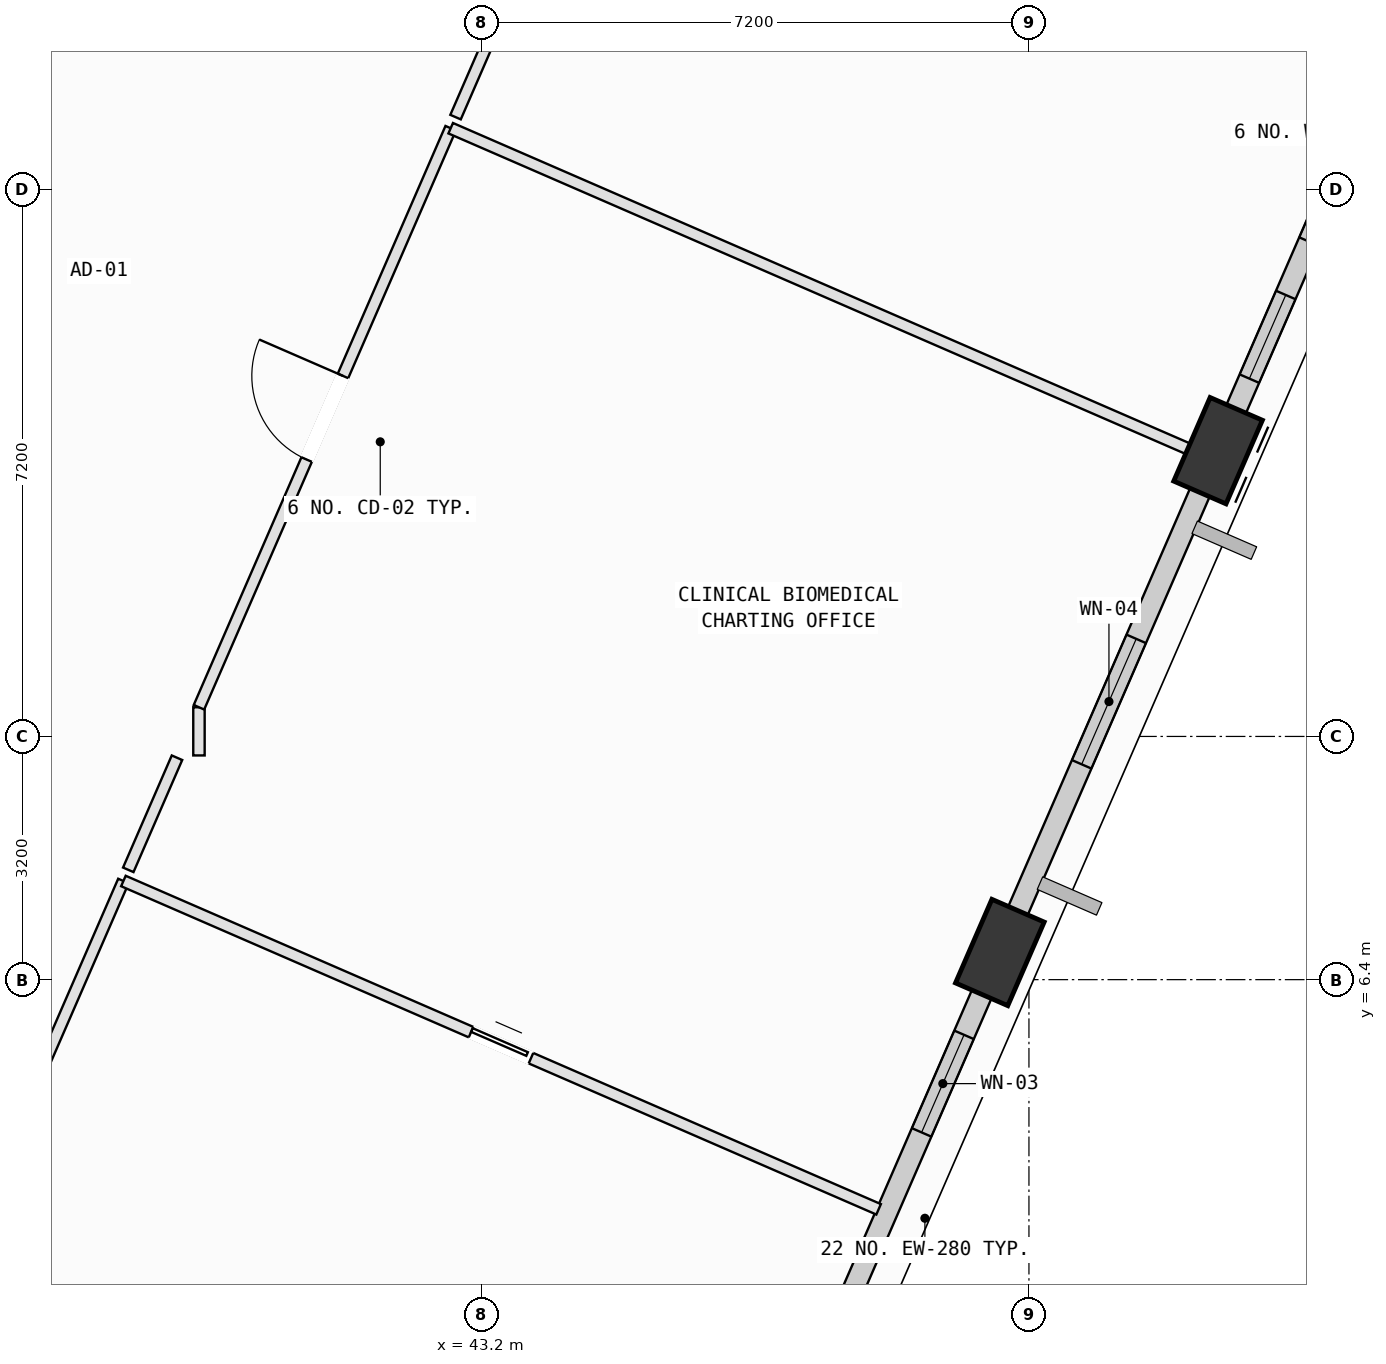
"""IFC4 building model, lengths in metres.
Left out: names, types, materials, properties, quantities, classifications, styles, units other than length and angle.
Written with IfcOpenShell. Run it as: python <this file> out.ifc"""

import sys

from ifc_helpers import new_model, si_unit, direction, frame, frame_2d, origin, origin_2d, place, context, subcontext, project, spatial, rectangle, extrude, element, fill, save


model = new_model("IFC4")
c1 = context("Model", 3, precision=1e-05, world=origin(), true_north=direction((0.0, 1.0)))
c2 = subcontext(c1, "Body", "Model", "MODEL_VIEW")
j1 = project(units=[si_unit("LENGTHUNIT", "METRE"), si_unit("PLANEANGLEUNIT", "RADIAN")], contexts=[c1])
p1 = place(None, origin())
s1 = spatial("IfcSite", under=j1, at=p1, CompositionType="ELEMENT")
p2 = place(p1, origin())
s2 = spatial("IfcBuilding", under=s1, at=p2, CompositionType="ELEMENT")
p3 = place(p2, frame((0.0, 0.0, 312.6)))
s3 = spatial("IfcBuildingStorey", under=s2, at=p3, CompositionType="ELEMENT", Elevation=312.6)
for number, where, z_axis, x_axis in (
    (1, (50.017, 6.757, 0.002), (0.0, 0.0, 1.0), (0.399, 0.917, 0.0)),
    (2, (52.888, 13.36, 0.002), (0.0, 0.0, 1.0), (0.399, 0.917, 0.0)),
):
    element("IfcColumn", number, at=place(p3, frame(where, z_axis=z_axis, x_axis=x_axis)), inside=s3, PredefinedType="COLUMN", context=c2, shape_type="SweptSolid", body=[
        extrude(rectangle(XDim=1.2, YDim=0.75, at=origin_2d()), origin(), (0.0, 0.0, 1.0), 3.996),
    ])
p4 = place(p3, frame((49.859, 6.393, 0.0), z_axis=(0.0, 0.0, 1.0), x_axis=(-0.398758169539, -0.917056117272, 0.0)))
e3 = element("IfcWall", 3, at=p4, inside=s3, PredefinedType="SOLIDWALL", context=c2, shape_type="SweptSolid", body=[
    extrude(rectangle(XDim=6.405, YDim=0.28, at=frame_2d((3.202, 0.0))), origin(), (0.0, 0.0, 1.0), 3.265),
])
p5 = place(p4, frame((0.784, 0.0, 0.75)))
e4 = element("IfcOpeningElement", 4, at=p5, cuts=e3, PredefinedType="OPENING", context=c2, shape_type="SweptSolid", body=[
    extrude(rectangle(XDim=1.4, YDim=1.85, at=frame_2d((0.7, 0.925))), frame((0.0, 0.15, 0.0), z_axis=(0.0, -1.0, 0.0), x_axis=(1.0, 0.0, 0.0)), (0.0, 0.0, 1.0), 0.3),
])
p6 = place(p3, frame((52.729, 12.996, 0.0), z_axis=(0.0, 0.0, 1.0), x_axis=(-0.398744230651, -0.917062178112, 0.0)))
e5 = element("IfcWall", 5, at=p6, inside=s3, PredefinedType="SOLIDWALL", context=c2, shape_type="SweptSolid", body=[
    extrude(rectangle(XDim=6.405, YDim=0.28, at=frame_2d((3.203, 0.0))), origin(), (0.0, 0.0, 1.0), 3.265),
])
p7 = place(p6, frame((2.302, 0.0, 0.75)))
e6 = element("IfcOpeningElement", 6, at=p7, cuts=e5, PredefinedType="OPENING", context=c2, shape_type="SweptSolid", body=[
    extrude(rectangle(XDim=1.8, YDim=2.05, at=frame_2d((0.9, 1.025))), frame((0.0, 0.15, 0.0), z_axis=(0.0, -1.0, 0.0), x_axis=(1.0, 0.0, 0.0)), (0.0, 0.0, 1.0), 0.3),
])
p8 = place(p3, frame((55.601, 19.598, 0.0), z_axis=(0.0, 0.0, 1.0), x_axis=(-0.398744230651, -0.917062178112, 0.0)))
e7 = element("IfcWall", 7, at=p8, inside=s3, PredefinedType="SOLIDWALL", context=c2, shape_type="SweptSolid", body=[
    extrude(rectangle(XDim=6.405, YDim=0.28, at=frame_2d((3.203, 0.0))), origin(), (0.0, 0.0, 1.0), 3.265),
])
p9 = place(p8, frame((2.602, 0.0, 0.75)))
e8 = element("IfcOpeningElement", 8, at=p9, cuts=e7, PredefinedType="OPENING", context=c2, shape_type="SweptSolid", body=[
    extrude(rectangle(XDim=1.2, YDim=1.75, at=frame_2d((0.6, 0.875))), frame((0.0, 0.15, 0.0), z_axis=(0.0, -1.0, 0.0), x_axis=(1.0, 0.0, 0.0)), (0.0, 0.0, 1.0), 0.3),
])
p10 = place(p8, frame((4.569, 0.0, 0.75)))
e9 = element("IfcOpeningElement", 9, at=p10, cuts=e7, PredefinedType="OPENING", context=c2, shape_type="SweptSolid", body=[
    extrude(rectangle(XDim=1.2, YDim=1.75, at=frame_2d((0.6, 0.875))), frame((0.0, 0.15, 0.0), z_axis=(0.0, -1.0, 0.0), x_axis=(1.0, 0.0, 0.0)), (0.0, 0.0, 1.0), 0.3),
])
p11 = place(p3, frame((33.286, -4.26, 0.0), z_axis=(0.0, 0.0, 1.0), x_axis=(0.398794571869, 0.9170402878, 0.0)))
e10 = element("IfcWall", 10, at=p11, inside=s3, PredefinedType="PARTITIONING", context=c2, shape_type="SweptSolid", body=[
    extrude(rectangle(XDim=13.04, YDim=0.15, at=frame_2d((6.52, 0.0))), origin(), (0.0, 0.0, 1.0), 2.765),
])
p12 = place(p3, frame((38.486, 7.698, 0.0), z_axis=(0.0, 0.0, 1.0), x_axis=(0.917068265028, -0.398730231207, 0.0)))
e11 = element("IfcWall", 11, at=p12, inside=s3, PredefinedType="PARTITIONING", context=c2, shape_type="SweptSolid", body=[
    extrude(rectangle(XDim=10.834, YDim=0.15, at=frame_2d((5.417, 0.0))), origin(), (0.0, 0.0, 1.0), 2.765),
])
p13 = place(p12, frame((4.987, 0.0, 0.0)))
e12 = element("IfcOpeningElement", 12, at=p13, cuts=e11, PredefinedType="OPENING", context=c2, shape_type="SweptSolid", body=[
    extrude(rectangle(XDim=0.86, YDim=2.06, at=frame_2d((0.43, 1.03))), frame((0.0, 0.085, 0.0), z_axis=(0.0, -1.0, 0.0), x_axis=(1.0, 0.0, 0.0)), (0.0, 0.0, 1.0), 0.17),
])
p14 = place(p3, frame((39.48, 9.35, 0.0), z_axis=(0.0, 0.0, 1.0), x_axis=(0.0, 1.0, 0.0)))
e13 = element("IfcWall", 13, at=p14, inside=s3, PredefinedType="PARTITIONING", context=c2, shape_type="SweptSolid", body=[
    extrude(rectangle(XDim=0.634, YDim=0.15, at=frame_2d((0.317, 0.0))), origin(), (0.0, 0.0, 1.0), 3.78),
])
p15 = place(p3, frame((39.48, 9.984, 0.0), z_axis=(0.0, 0.0, 1.0), x_axis=(0.398659488131, 0.917099020021, 0.0)))
e14 = element("IfcWall", 14, at=p15, inside=s3, PredefinedType="PARTITIONING", context=c2, shape_type="SweptSolid", body=[
    extrude(rectangle(XDim=8.308, YDim=0.15, at=frame_2d((4.154, 0.0))), origin(), (0.0, 0.0, 1.0), 3.78),
])
p16 = place(p15, frame((3.554, 0.0, 0.0)))
e15 = element("IfcOpeningElement", 15, at=p16, cuts=e14, PredefinedType="OPENING", context=c2, shape_type="SweptSolid", body=[
    extrude(rectangle(XDim=1.2, YDim=2.15, at=frame_2d((0.6, 1.075))), frame((0.0, 0.085, 0.0), z_axis=(0.0, -1.0, 0.0), x_axis=(1.0, 0.0, 0.0)), (0.0, 0.0, 1.0), 0.17),
])
p17 = place(p3, frame((42.792, 17.603, 0.0), z_axis=(0.0, 0.0, 1.0), x_axis=(0.917063112739, -0.398742081117, 0.0)))
e16 = element("IfcWall", 16, at=p17, inside=s3, PredefinedType="PARTITIONING", context=c2, shape_type="SweptSolid", body=[
    extrude(rectangle(XDim=11.18, YDim=0.15, at=frame_2d((5.59, 0.0))), origin(), (0.0, 0.0, 1.0), 3.78),
])
p18 = place(p3, frame((50.386, 7.03, 0.0), z_axis=(0.0, 0.0, 1.0), x_axis=(-0.398658726612, -0.91709935105, 0.0)))
e17 = element("IfcWall", 17, at=p18, inside=s3, PredefinedType="PARTITIONING", context=c2, shape_type="SweptSolid", body=[
    extrude(rectangle(XDim=0.795, YDim=0.15, at=frame_2d((0.397, 0.0))), origin(), (0.0, 0.0, 1.0), 3.265),
])
p19 = place(p3, frame((38.55, 7.845, 0.0), z_axis=(0.0, 0.0, 1.0), x_axis=(0.398476313607, 0.917178623548, 0.0)))
e18 = element("IfcWall", 18, at=p19, inside=s3, PredefinedType="PARTITIONING", context=c2, shape_type="SweptSolid", body=[
    extrude(rectangle(XDim=1.608, YDim=0.15, at=frame_2d((0.804, 0.0))), origin(), (0.0, 0.0, 1.0), 3.78),
])
p20 = place(p3, frame((42.856, 17.749, 0.0), z_axis=(0.0, 0.0, 1.0), x_axis=(0.398751440491, 0.917059043195, 0.0)))
e19 = element("IfcWall", 19, at=p20, inside=s3, PredefinedType="PARTITIONING", context=c2, shape_type="SweptSolid", body=[
    extrude(rectangle(XDim=13.041, YDim=0.15, at=frame_2d((6.52, 0.0))), origin(), (0.0, 0.0, 1.0), 3.78),
])
p21 = place(p20, frame((5.92, 0.0, 0.0)))
e20 = element("IfcOpeningElement", 20, at=p21, cuts=e19, PredefinedType="OPENING", context=c2, shape_type="SweptSolid", body=[
    extrude(rectangle(XDim=1.2, YDim=2.15, at=frame_2d((0.6, 1.075))), frame((0.0, 0.085, 0.0), z_axis=(0.0, -1.0, 0.0), x_axis=(1.0, 0.0, 0.0)), (0.0, 0.0, 1.0), 0.17),
])
p22 = place(p5, origin())
e21 = element("IfcWindow", 21, at=p22, inside=s3, PartitioningType="SINGLE_PANEL", PredefinedType="WINDOW", context=c2, shape_type="SweptSolid", body=[
    extrude(rectangle(XDim=1.4, YDim=1.85, at=frame_2d((0.7, 0.925))), frame((0.0, 0.03, 0.0), z_axis=(0.0, -1.0, 0.0), x_axis=(1.0, 0.0, 0.0)), (0.0, 0.0, 1.0), 0.06),
])
fill(e4, e21)
p23 = place(p7, origin())
e22 = element("IfcWindow", 22, at=p23, inside=s3, PartitioningType="SINGLE_PANEL", PredefinedType="WINDOW", context=c2, shape_type="SweptSolid", body=[
    extrude(rectangle(XDim=1.8, YDim=2.05, at=frame_2d((0.9, 1.025))), frame((0.0, 0.03, 0.0), z_axis=(0.0, -1.0, 0.0), x_axis=(1.0, 0.0, 0.0)), (0.0, 0.0, 1.0), 0.06),
])
fill(e6, e22)
p24 = place(p10, origin())
e23 = element("IfcWindow", 23, at=p24, inside=s3, PartitioningType="SINGLE_PANEL", PredefinedType="WINDOW", context=c2, shape_type="SweptSolid", body=[
    extrude(rectangle(XDim=1.2, YDim=1.75, at=frame_2d((0.6, 0.875))), frame((0.0, 0.03, 0.0), z_axis=(0.0, -1.0, 0.0), x_axis=(1.0, 0.0, 0.0)), (0.0, 0.0, 1.0), 0.06),
])
fill(e9, e23)
p25 = place(p16, origin())
e24 = element("IfcDoor", 24, at=p25, inside=s3, OperationType="SINGLE_SWING_RIGHT", PredefinedType="DOOR", context=c2, shape_type="SweptSolid", body=[
    extrude(rectangle(XDim=1.2, YDim=2.15, at=frame_2d((0.6, 1.075))), frame((0.0, 0.025, 0.0), z_axis=(0.0, -1.0, 0.0), x_axis=(1.0, 0.0, 0.0)), (0.0, 0.0, 1.0), 0.05),
])
fill(e15, e24)
p26 = place(p13, origin())
e25 = element("IfcDoor", 25, at=p26, inside=s3, OperationType="SLIDING_TO_LEFT", PredefinedType="DOOR", context=c2, shape_type="SweptSolid", body=[
    extrude(rectangle(XDim=0.86, YDim=2.06, at=frame_2d((0.43, 1.03))), frame((0.0, 0.025, 0.0), z_axis=(0.0, -1.0, 0.0), x_axis=(1.0, 0.0, 0.0)), (0.0, 0.0, 1.0), 0.05),
])
fill(e12, e25)
save(model, sys.argv[1])
